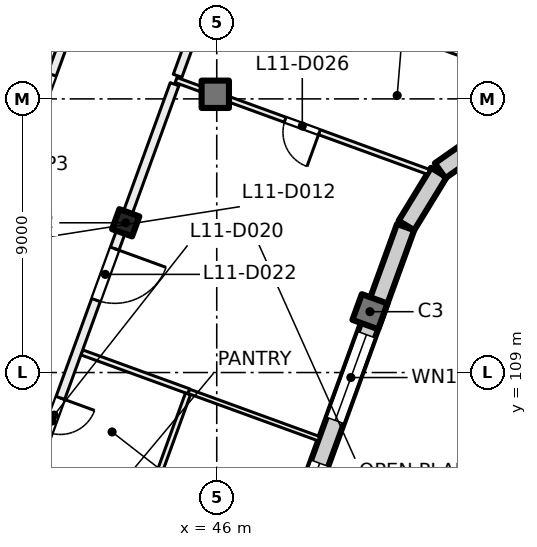
"""IFC4 building model, lengths in metres.
Left out: names, types, materials, properties, quantities, classifications, styles, units other than length and angle.
Written with IfcOpenShell. Run it as: python <this file> out.ifc"""

import sys

from ifc_helpers import new_model, si_unit, direction, frame, frame_2d, origin, origin_2d, place, context, subcontext, project, spatial, rectangle, extrude, element, fill, save


model = new_model("IFC4")
c1 = context("Model", 3, precision=1e-05, world=origin(), true_north=direction((0.0, 1.0)))
c2 = subcontext(c1, "Body", "Model", "MODEL_VIEW")
j1 = project(units=[si_unit("LENGTHUNIT", "METRE"), si_unit("PLANEANGLEUNIT", "RADIAN")], contexts=[c1])
p1 = place(None, origin())
s1 = spatial("IfcSite", under=j1, at=p1, CompositionType="ELEMENT")
p2 = place(p1, origin())
s2 = spatial("IfcBuilding", under=s1, at=p2, CompositionType="ELEMENT")
p3 = place(p2, frame((0.0, 0.0, 51.5)))
s3 = spatial("IfcBuildingStorey", under=s2, at=p3, CompositionType="ELEMENT", Elevation=51.5)
p4 = place(p3, frame((45.952, 118.152, 0.0), z_axis=(0.0, 0.0, 1.0), x_axis=(1.0, 0.0, 0.0)))
e1 = element("IfcColumn", 1, at=p4, inside=s3, PredefinedType="COLUMN", context=c2, shape_type="SweptSolid", body=[
    extrude(rectangle(XDim=0.9, YDim=0.9, at=origin_2d()), origin(), (0.0, 0.0, 1.0), 4.0),
])
p5 = place(p3, frame((43.006, 113.925, 0.0), z_axis=(0.0, 0.0, 1.0), x_axis=(-0.342020143326, -0.939692620786, 0.0)))
e2 = element("IfcColumn", 2, at=p5, inside=s3, PredefinedType="COLUMN", context=c2, shape_type="SweptSolid", body=[
    extrude(rectangle(XDim=0.7, YDim=0.7, at=origin_2d()), origin(), (0.0, 0.0, 1.0), 4.0),
])
p6 = place(p3, frame((51.04, 111.001, 0.0), z_axis=(0.0, 0.0, 1.0), x_axis=(-0.342020143326, -0.939692620786, 0.0)))
e3 = element("IfcColumn", 3, at=p6, inside=s3, PredefinedType="COLUMN", context=c2, shape_type="SweptSolid", body=[
    extrude(rectangle(XDim=0.9, YDim=0.9, at=origin_2d()), origin(), (0.0, 0.0, 1.0), 4.0),
])
p7 = place(p3, frame((52.212, 113.783, 0.0), z_axis=(0.0, 0.0, 1.0), x_axis=(-0.34202521188, -0.939690775968, 0.0)))
e4 = element("IfcWall", 4, at=p7, inside=s3, PredefinedType="SOLIDWALL", context=c2, shape_type="SweptSolid", body=[
    extrude(rectangle(XDim=21.745, YDim=0.6, at=frame_2d((10.873, 0.0))), origin(), (0.0, 0.0, 1.0), 3.625),
])
p8 = place(p7, frame((3.765, 0.0, 0.9)))
e5 = element("IfcOpeningElement", 5, at=p8, cuts=e4, PredefinedType="OPENING", context=c2, shape_type="SweptSolid", body=[
    extrude(rectangle(XDim=3.0, YDim=2.4, at=frame_2d((1.5, 1.2))), frame((0.0, 0.31, 0.0), z_axis=(0.0, -1.0, 0.0), x_axis=(1.0, 0.0, 0.0)), (0.0, 0.0, 1.0), 0.62),
])
p9 = place(p7, frame((8.265, 0.0, 0.9)))
e6 = element("IfcOpeningElement", 6, at=p9, cuts=e4, PredefinedType="OPENING", context=c2, shape_type="SweptSolid", body=[
    extrude(rectangle(XDim=3.0, YDim=2.4, at=frame_2d((1.5, 1.2))), frame((0.0, 0.31, 0.0), z_axis=(0.0, -1.0, 0.0), x_axis=(1.0, 0.0, 0.0)), (0.0, 0.0, 1.0), 0.62),
])
p10 = place(p7, frame((12.765, 0.0, 0.9)))
e7 = element("IfcOpeningElement", 7, at=p10, cuts=e4, PredefinedType="OPENING", context=c2, shape_type="SweptSolid", body=[
    extrude(rectangle(XDim=3.0, YDim=2.4, at=frame_2d((1.5, 1.2))), frame((0.0, 0.31, 0.0), z_axis=(0.0, -1.0, 0.0), x_axis=(1.0, 0.0, 0.0)), (0.0, 0.0, 1.0), 0.62),
])
p11 = place(p7, frame((17.265, 0.0, 0.9)))
e8 = element("IfcOpeningElement", 8, at=p11, cuts=e4, PredefinedType="OPENING", context=c2, shape_type="SweptSolid", body=[
    extrude(rectangle(XDim=3.0, YDim=2.4, at=frame_2d((1.5, 1.2))), frame((0.0, 0.31, 0.0), z_axis=(0.0, -1.0, 0.0), x_axis=(1.0, 0.0, 0.0)), (0.0, 0.0, 1.0), 0.62),
])
p12 = place(p3, frame((53.305, 115.578, 0.0), z_axis=(0.0, 0.0, 1.0), x_axis=(-0.522402266438, -0.852699168535, 0.0)))
e9 = element("IfcWall", 9, at=p12, inside=s3, PredefinedType="SOLIDWALL", context=c2, shape_type="SweptSolid", body=[
    extrude(rectangle(XDim=2.042, YDim=0.6, at=frame_2d((1.021, 0.0))), origin(), (0.0, 0.0, 1.0), 3.625),
])
p13 = place(p3, frame((55.062, 116.839, 0.0), z_axis=(0.0, 0.0, 1.0), x_axis=(-0.819122269495, -0.573618956815, 0.0)))
e10 = element("IfcWall", 10, at=p13, inside=s3, PredefinedType="SOLIDWALL", context=c2, shape_type="SweptSolid", body=[
    extrude(rectangle(XDim=2.092, YDim=0.6, at=frame_2d((1.046, 0.0))), origin(), (0.0, 0.0, 1.0), 3.625),
])
p14 = place(p3, frame((32.881, 97.657, 0.0), z_axis=(0.0, 0.0, 1.0), x_axis=(0.342017360004, 0.939693633828, 0.0)))
e11 = element("IfcWall", 11, at=p14, inside=s3, PredefinedType="PARTITIONING", context=c2, shape_type="SweptSolid", body=[
    extrude(rectangle(XDim=34.516, YDim=0.3, at=frame_2d((17.258, 0.0))), origin(), (0.0, 0.0, 1.0), 3.625),
])
p15 = place(p14, frame((4.275, 0.0, 0.0)))
e12 = element("IfcOpeningElement", 12, at=p15, cuts=e11, PredefinedType="OPENING", context=c2, shape_type="SweptSolid", body=[
    extrude(rectangle(XDim=1.2, YDim=2.1, at=frame_2d((0.6, 1.05))), frame((0.0, 0.16, 0.0), z_axis=(0.0, -1.0, 0.0), x_axis=(1.0, 0.0, 0.0)), (0.0, 0.0, 1.0), 0.32),
])
p16 = place(p14, frame((16.0, 0.0, 0.0)))
e13 = element("IfcOpeningElement", 13, at=p16, cuts=e11, PredefinedType="OPENING", context=c2, shape_type="SweptSolid", body=[
    extrude(rectangle(XDim=1.0, YDim=2.1, at=frame_2d((0.5, 1.05))), frame((0.0, 0.16, 0.0), z_axis=(0.0, -1.0, 0.0), x_axis=(1.0, 0.0, 0.0)), (0.0, 0.0, 1.0), 0.32),
])
p17 = place(p14, frame((21.5, 0.0, 0.0)))
e14 = element("IfcOpeningElement", 14, at=p17, cuts=e11, PredefinedType="OPENING", context=c2, shape_type="SweptSolid", body=[
    extrude(rectangle(XDim=1.0, YDim=2.1, at=frame_2d((0.5, 1.05))), frame((0.0, 0.16, 0.0), z_axis=(0.0, -1.0, 0.0), x_axis=(1.0, 0.0, 0.0)), (0.0, 0.0, 1.0), 0.32),
])
p18 = place(p3, frame((41.561, 109.663, 0.0), z_axis=(0.0, 0.0, 1.0), x_axis=(0.939610777088, -0.34224492338, 0.0)))
e15 = element("IfcWall", 15, at=p18, inside=s3, PredefinedType="PARTITIONING", context=c2, shape_type="SweptSolid", body=[
    extrude(rectangle(XDim=3.749, YDim=0.175, at=frame_2d((1.875, 0.0))), origin(), (0.0, 0.0, 1.0), 3.625),
])
p19 = place(p3, frame((52.965, 115.598, 0.0), z_axis=(0.0, 0.0, 1.0), x_axis=(-0.939650555598, 0.342135694374, 0.0)))
e16 = element("IfcWall", 16, at=p19, inside=s3, PredefinedType="PARTITIONING", context=c2, shape_type="SweptSolid", body=[
    extrude(rectangle(XDim=8.836, YDim=0.175, at=frame_2d((4.418, 0.0))), origin(), (0.0, 0.0, 1.0), 3.625),
])
p20 = place(p19, frame((3.818, 0.0, 0.0)))
e17 = element("IfcOpeningElement", 17, at=p20, cuts=e16, PredefinedType="OPENING", context=c2, shape_type="SweptSolid", body=[
    extrude(rectangle(XDim=1.2, YDim=2.1, at=frame_2d((0.6, 1.05))), frame((0.0, 0.097, 0.0), z_axis=(0.0, -1.0, 0.0), x_axis=(1.0, 0.0, 0.0)), (0.0, 0.0, 1.0), 0.195),
])
p21 = place(p3, frame((44.612, 118.483, 0.0), z_axis=(0.0, 0.0, 1.0), x_axis=(-0.342043123066, -0.939684256526, 0.0)))
e18 = element("IfcWall", 18, at=p21, inside=s3, PredefinedType="PARTITIONING", context=c2, shape_type="SweptSolid", body=[
    extrude(rectangle(XDim=23.582, YDim=0.3, at=frame_2d((11.791, 0.0))), origin(), (0.0, 0.0, 1.0), 3.625),
])
p22 = place(p21, frame((14.932, 0.0, 0.0)))
e19 = element("IfcOpeningElement", 19, at=p22, cuts=e18, PredefinedType="OPENING", context=c2, shape_type="SweptSolid", body=[
    extrude(rectangle(XDim=0.8, YDim=2.1, at=frame_2d((0.4, 1.05))), frame((0.0, 0.16, 0.0), z_axis=(0.0, -1.0, 0.0), x_axis=(1.0, 0.0, 0.0)), (0.0, 0.0, 1.0), 0.32),
])
p23 = place(p21, frame((10.982, 0.0, 0.0)))
e20 = element("IfcOpeningElement", 20, at=p23, cuts=e18, PredefinedType="OPENING", context=c2, shape_type="SweptSolid", body=[
    extrude(rectangle(XDim=1.2, YDim=2.1, at=frame_2d((0.6, 1.05))), frame((0.0, 0.16, 0.0), z_axis=(0.0, -1.0, 0.0), x_axis=(1.0, 0.0, 0.0)), (0.0, 0.0, 1.0), 0.32),
])
p24 = place(p21, frame((19.307, 0.0, 0.0)))
e21 = element("IfcOpeningElement", 21, at=p24, cuts=e18, PredefinedType="OPENING", context=c2, shape_type="SweptSolid", body=[
    extrude(rectangle(XDim=1.8, YDim=2.1, at=frame_2d((0.9, 1.05))), frame((0.0, 0.16, 0.0), z_axis=(0.0, -1.0, 0.0), x_axis=(1.0, 0.0, 0.0)), (0.0, 0.0, 1.0), 0.32),
])
p25 = place(p21, frame((5.756, 0.0, 0.0)))
e22 = element("IfcOpeningElement", 22, at=p25, cuts=e18, PredefinedType="OPENING", context=c2, shape_type="SweptSolid", body=[
    extrude(rectangle(XDim=1.8, YDim=2.1, at=frame_2d((0.9, 1.05))), frame((0.0, 0.16, 0.0), z_axis=(0.0, -1.0, 0.0), x_axis=(1.0, 0.0, 0.0)), (0.0, 0.0, 1.0), 0.32),
])
p26 = place(p3, frame((45.054, 108.298, 0.0), z_axis=(0.0, 0.0, 1.0), x_axis=(-0.34193405199, -0.939723951004, 0.0)))
e23 = element("IfcWall", 23, at=p26, inside=s3, PredefinedType="PARTITIONING", context=c2, shape_type="SweptSolid", body=[
    extrude(rectangle(XDim=4.413, YDim=0.175, at=frame_2d((2.207, 0.0))), origin(), (0.0, 0.0, 1.0), 3.625),
])
p27 = place(p3, frame((45.084, 108.38, 0.0), z_axis=(0.0, 0.0, 1.0), x_axis=(0.93972604571, -0.341928295136, 0.0)))
e24 = element("IfcWall", 24, at=p27, inside=s3, PredefinedType="PARTITIONING", context=c2, shape_type="SweptSolid", body=[
    extrude(rectangle(XDim=4.55, YDim=0.15, at=frame_2d((2.275, 0.0))), origin(), (0.0, 0.0, 1.0), 3.625),
])
p28 = place(p3, frame((47.314, 125.909, 0.0), z_axis=(0.0, 0.0, 1.0), x_axis=(-0.34198522802, -0.939705328183, 0.0)))
e25 = element("IfcWall", 25, at=p28, inside=s3, PredefinedType="PARTITIONING", context=c2, shape_type="SweptSolid", body=[
    extrude(rectangle(XDim=7.609, YDim=0.3, at=frame_2d((3.804, 0.0))), origin(), (0.0, 0.0, 1.0), 3.625),
])
p29 = place(p3, frame((54.32, 119.384, 0.0), z_axis=(0.0, 0.0, 1.0), x_axis=(-0.939632908118, 0.342184157994, 0.0)))
e26 = element("IfcWall", 26, at=p29, inside=s3, PredefinedType="PARTITIONING", context=c2, shape_type="SweptSolid", body=[
    extrude(rectangle(XDim=8.665, YDim=0.175, at=frame_2d((4.333, 0.0))), origin(), (0.0, 0.0, 1.0), 3.625),
])
p30 = place(p8, origin())
e27 = element("IfcWindow", 27, at=p30, inside=s3, PartitioningType="SINGLE_PANEL", PredefinedType="WINDOW", context=c2, shape_type="SweptSolid", body=[
    extrude(rectangle(XDim=3.0, YDim=2.4, at=frame_2d((1.5, 1.2))), frame((0.0, 0.03, 0.0), z_axis=(0.0, -1.0, 0.0), x_axis=(1.0, 0.0, 0.0)), (0.0, 0.0, 1.0), 0.06),
])
fill(e5, e27)
p31 = place(p9, origin())
e28 = element("IfcWindow", 28, at=p31, inside=s3, PartitioningType="SINGLE_PANEL", PredefinedType="WINDOW", context=c2, shape_type="SweptSolid", body=[
    extrude(rectangle(XDim=3.0, YDim=2.4, at=frame_2d((1.5, 1.2))), frame((0.0, 0.03, 0.0), z_axis=(0.0, -1.0, 0.0), x_axis=(1.0, 0.0, 0.0)), (0.0, 0.0, 1.0), 0.06),
])
fill(e6, e28)
p32 = place(p17, origin())
e29 = element("IfcDoor", 29, at=p32, inside=s3, OperationType="SINGLE_SWING_LEFT", PredefinedType="DOOR", context=c2, shape_type="SweptSolid", body=[
    extrude(rectangle(XDim=1.0, YDim=2.1, at=frame_2d((0.5, 1.05))), frame((0.0, 0.025, 0.0), z_axis=(0.0, -1.0, 0.0), x_axis=(1.0, 0.0, 0.0)), (0.0, 0.0, 1.0), 0.05),
])
fill(e14, e29)
p33 = place(p23, origin())
e30 = element("IfcDoor", 30, at=p33, inside=s3, OperationType="DOUBLE_DOOR_SINGLE_SWING", PredefinedType="DOOR", context=c2, shape_type="SweptSolid", body=[
    extrude(rectangle(XDim=1.2, YDim=2.1, at=frame_2d((0.6, 1.05))), frame((0.0, 0.025, 0.0), z_axis=(0.0, -1.0, 0.0), x_axis=(1.0, 0.0, 0.0)), (0.0, 0.0, 1.0), 0.05),
])
fill(e20, e30)
p34 = place(p25, origin())
e31 = element("IfcDoor", 31, at=p34, inside=s3, OperationType="DOUBLE_DOOR_SINGLE_SWING", PredefinedType="DOOR", context=c2, shape_type="SweptSolid", body=[
    extrude(rectangle(XDim=1.8, YDim=2.1, at=frame_2d((0.9, 1.05))), frame((0.0, 0.025, 0.0), z_axis=(0.0, -1.0, 0.0), x_axis=(1.0, 0.0, 0.0)), (0.0, 0.0, 1.0), 0.05),
])
fill(e22, e31)
p35 = place(p20, origin())
e32 = element("IfcDoor", 32, at=p35, inside=s3, OperationType="DOUBLE_DOOR_SINGLE_SWING", PredefinedType="DOOR", context=c2, shape_type="SweptSolid", body=[
    extrude(rectangle(XDim=1.2, YDim=2.1, at=frame_2d((0.6, 1.05))), frame((0.0, 0.025, 0.0), z_axis=(0.0, -1.0, 0.0), x_axis=(1.0, 0.0, 0.0)), (0.0, 0.0, 1.0), 0.05),
])
fill(e17, e32)
save(model, sys.argv[1])
